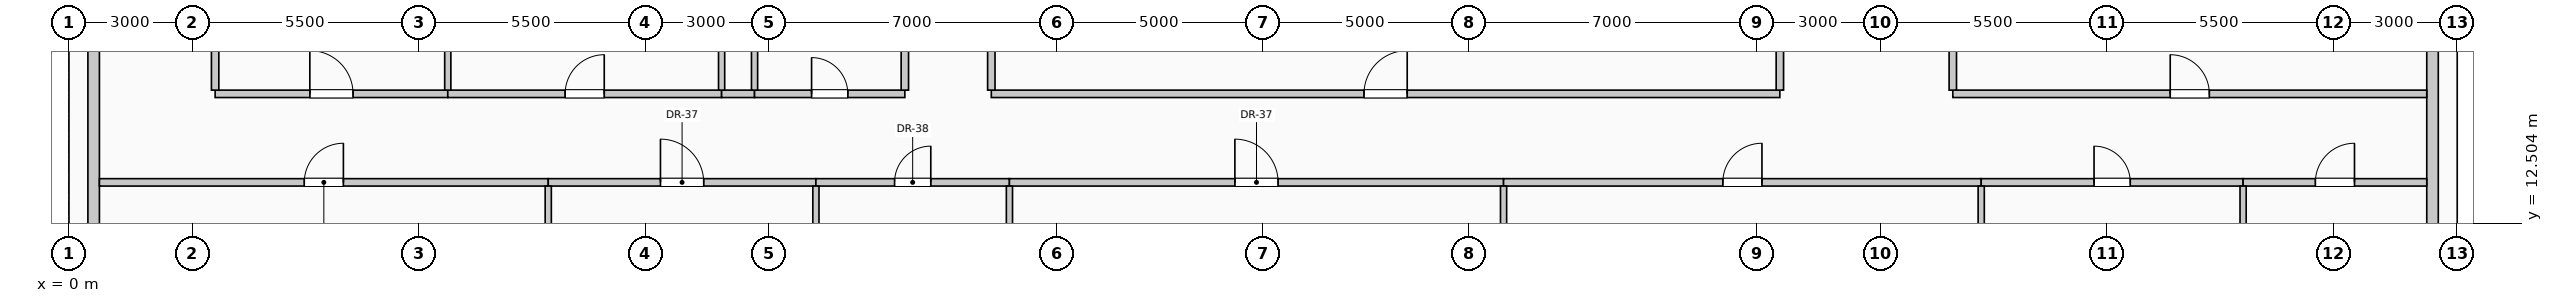
"""IFC4 building model, lengths in metres.
Left out: names, types, materials, properties, quantities, classifications, styles, units other than length and angle.
Written with IfcOpenShell. Run it as: python <this file> out.ifc"""

import sys

from ifc_helpers import new_model, si_unit, direction, frame, frame_2d, origin, place, context, subcontext, project, spatial, rectangle, extrude, element, fill, save


model = new_model("IFC4")
c1 = context("Model", 3, precision=1e-05, world=origin(), true_north=direction((0.0, 1.0)))
c2 = subcontext(c1, "Body", "Model", "MODEL_VIEW")
j1 = project(units=[si_unit("LENGTHUNIT", "METRE"), si_unit("PLANEANGLEUNIT", "RADIAN")], contexts=[c1])
p1 = place(None, origin())
s1 = spatial("IfcSite", under=j1, at=p1, CompositionType="ELEMENT")
p2 = place(p1, origin())
s2 = spatial("IfcBuilding", under=s1, at=p2, CompositionType="ELEMENT")
p3 = place(p2, frame((0.0, 0.0, 156.6)))
s3 = spatial("IfcBuildingStorey", under=s2, at=p3, CompositionType="ELEMENT", Elevation=156.6)
for number, where, z_axis, x_axis in (
    (1, (0.6, 10.445, 0.0), (0.0, 0.0, 1.0), (0.0, 1.0, 0.0)),
    (2, (57.4, 17.555, 0.0), (0.0, 0.0, 1.0), (0.0, -1.0, 0.0)),
):
    element("IfcWall", number, at=place(p3, frame(where, z_axis=z_axis, x_axis=x_axis)), inside=s3, PredefinedType="SOLIDWALL", context=c2, shape_type="SweptSolid", body=[
        extrude(rectangle(XDim=7.11, YDim=0.28, at=frame_2d((3.555, 0.0))), origin(), (0.0, 0.0, 1.0), 2.81),
    ])
p4 = place(p3, frame((0.74, 13.5, 0.0), z_axis=(0.0, 0.0, 1.0), x_axis=(1.0, 0.0, 0.0)))
e3 = element("IfcWall", 3, at=p4, inside=s3, PredefinedType="PARTITIONING", context=c2, shape_type="SweptSolid", body=[
    extrude(rectangle(XDim=10.9, YDim=0.18, at=frame_2d((5.45, 0.0))), origin(), (0.0, 0.0, 1.0), 3.66),
])
p5 = place(p4, frame((4.975, 0.0, 0.0)))
e4 = element("IfcOpeningElement", 4, at=p5, cuts=e3, PredefinedType="OPENING", context=c2, shape_type="SweptSolid", body=[
    extrude(rectangle(XDim=0.95, YDim=2.15, at=frame_2d((0.475, 1.075))), frame((0.0, 0.1, 0.0), z_axis=(0.0, -1.0, 0.0), x_axis=(1.0, 0.0, 0.0)), (0.0, 0.0, 1.0), 0.2),
])
p6 = place(p3, frame((11.64, 13.5, 0.0), z_axis=(0.0, 0.0, 1.0), x_axis=(1.0, 0.0, 0.0)))
e5 = element("IfcWall", 5, at=p6, inside=s3, PredefinedType="PARTITIONING", context=c2, shape_type="SweptSolid", body=[
    extrude(rectangle(XDim=6.5, YDim=0.18, at=frame_2d((3.25, 0.0))), origin(), (0.0, 0.0, 1.0), 3.66),
])
p7 = place(p6, frame((2.725, 0.0, 0.0)))
e6 = element("IfcOpeningElement", 6, at=p7, cuts=e5, PredefinedType="OPENING", context=c2, shape_type="SweptSolid", body=[
    extrude(rectangle(XDim=1.05, YDim=2.15, at=frame_2d((0.525, 1.075))), frame((0.0, 0.1, 0.0), z_axis=(0.0, -1.0, 0.0), x_axis=(1.0, 0.0, 0.0)), (0.0, 0.0, 1.0), 0.2),
])
p8 = place(p3, frame((18.14, 13.5, 0.0), z_axis=(0.0, 0.0, 1.0), x_axis=(1.0, 0.0, 0.0)))
e7 = element("IfcWall", 7, at=p8, inside=s3, PredefinedType="PARTITIONING", context=c2, shape_type="SweptSolid", body=[
    extrude(rectangle(XDim=4.7, YDim=0.18, at=frame_2d((2.35, 0.0))), origin(), (0.0, 0.0, 1.0), 3.66),
])
p9 = place(p8, frame((1.91, 0.0, 0.0)))
e8 = element("IfcOpeningElement", 8, at=p9, cuts=e7, PredefinedType="OPENING", context=c2, shape_type="SweptSolid", body=[
    extrude(rectangle(XDim=0.88, YDim=2.1, at=frame_2d((0.44, 1.05))), frame((0.0, 0.1, 0.0), z_axis=(0.0, -1.0, 0.0), x_axis=(1.0, 0.0, 0.0)), (0.0, 0.0, 1.0), 0.2),
])
p10 = place(p3, frame((22.84, 13.5, 0.0), z_axis=(0.0, 0.0, 1.0), x_axis=(1.0, 0.0, 0.0)))
e9 = element("IfcWall", 9, at=p10, inside=s3, PredefinedType="PARTITIONING", context=c2, shape_type="SweptSolid", body=[
    extrude(rectangle(XDim=12.0, YDim=0.18, at=frame_2d((6.0, 0.0))), origin(), (0.0, 0.0, 1.0), 3.66),
])
p11 = place(p10, frame((5.475, 0.0, 0.0)))
e10 = element("IfcOpeningElement", 10, at=p11, cuts=e9, PredefinedType="OPENING", context=c2, shape_type="SweptSolid", body=[
    extrude(rectangle(XDim=1.05, YDim=2.15, at=frame_2d((0.525, 1.075))), frame((0.0, 0.1, 0.0), z_axis=(0.0, -1.0, 0.0), x_axis=(1.0, 0.0, 0.0)), (0.0, 0.0, 1.0), 0.2),
])
p12 = place(p3, frame((34.84, 13.5, 0.0), z_axis=(0.0, 0.0, 1.0), x_axis=(1.0, 0.0, 0.0)))
e11 = element("IfcWall", 11, at=p12, inside=s3, PredefinedType="PARTITIONING", context=c2, shape_type="SweptSolid", body=[
    extrude(rectangle(XDim=11.6, YDim=0.18, at=frame_2d((5.8, 0.0))), origin(), (0.0, 0.0, 1.0), 3.66),
])
p13 = place(p12, frame((5.325, 0.0, 0.0)))
e12 = element("IfcOpeningElement", 12, at=p13, cuts=e11, PredefinedType="OPENING", context=c2, shape_type="SweptSolid", body=[
    extrude(rectangle(XDim=0.95, YDim=2.15, at=frame_2d((0.475, 1.075))), frame((0.0, 0.1, 0.0), z_axis=(0.0, -1.0, 0.0), x_axis=(1.0, 0.0, 0.0)), (0.0, 0.0, 1.0), 0.2),
])
p14 = place(p3, frame((46.44, 13.5, 0.0), z_axis=(0.0, 0.0, 1.0), x_axis=(1.0, 0.0, 0.0)))
e13 = element("IfcWall", 13, at=p14, inside=s3, PredefinedType="PARTITIONING", context=c2, shape_type="SweptSolid", body=[
    extrude(rectangle(XDim=6.36, YDim=0.18, at=frame_2d((3.18, 0.0))), origin(), (0.0, 0.0, 1.0), 3.66),
])
p15 = place(p14, frame((2.74, 0.0, 0.0)))
e14 = element("IfcOpeningElement", 14, at=p15, cuts=e13, PredefinedType="OPENING", context=c2, shape_type="SweptSolid", body=[
    extrude(rectangle(XDim=0.88, YDim=2.1, at=frame_2d((0.44, 1.05))), frame((0.0, 0.1, 0.0), z_axis=(0.0, -1.0, 0.0), x_axis=(1.0, 0.0, 0.0)), (0.0, 0.0, 1.0), 0.2),
])
p16 = place(p3, frame((52.8, 13.5, 0.0), z_axis=(0.0, 0.0, 1.0), x_axis=(1.0, 0.0, 0.0)))
e15 = element("IfcWall", 15, at=p16, inside=s3, PredefinedType="PARTITIONING", context=c2, shape_type="SweptSolid", body=[
    extrude(rectangle(XDim=4.46, YDim=0.18, at=frame_2d((2.23, 0.0))), origin(), (0.0, 0.0, 1.0), 3.66),
])
p17 = place(p16, frame((1.755, 0.0, 0.0)))
e16 = element("IfcOpeningElement", 16, at=p17, cuts=e15, PredefinedType="OPENING", context=c2, shape_type="SweptSolid", body=[
    extrude(rectangle(XDim=0.95, YDim=2.15, at=frame_2d((0.475, 1.075))), frame((0.0, 0.1, 0.0), z_axis=(0.0, -1.0, 0.0), x_axis=(1.0, 0.0, 0.0)), (0.0, 0.0, 1.0), 0.2),
])
p18 = place(p3, frame((3.55, 15.65, 0.0), z_axis=(0.0, 0.0, 1.0), x_axis=(1.0, 0.0, 0.0)))
e17 = element("IfcWall", 17, at=p18, inside=s3, PredefinedType="PARTITIONING", context=c2, shape_type="SweptSolid", body=[
    extrude(rectangle(XDim=5.65, YDim=0.18, at=frame_2d((2.825, 0.0))), origin(), (0.0, 0.0, 1.0), 3.66),
])
p19 = place(p18, frame((2.3, 0.0, 0.0)))
e18 = element("IfcOpeningElement", 18, at=p19, cuts=e17, PredefinedType="OPENING", context=c2, shape_type="SweptSolid", body=[
    extrude(rectangle(XDim=1.05, YDim=2.15, at=frame_2d((0.525, 1.075))), frame((0.0, 0.1, 0.0), z_axis=(0.0, -1.0, 0.0), x_axis=(1.0, 0.0, 0.0)), (0.0, 0.0, 1.0), 0.2),
])
p20 = place(p3, frame((9.2, 15.65, 0.0), z_axis=(0.0, 0.0, 1.0), x_axis=(1.0, 0.0, 0.0)))
e19 = element("IfcWall", 19, at=p20, inside=s3, PredefinedType="PARTITIONING", context=c2, shape_type="SweptSolid", body=[
    extrude(rectangle(XDim=6.65, YDim=0.18, at=frame_2d((3.325, 0.0))), origin(), (0.0, 0.0, 1.0), 3.66),
])
p21 = place(p20, frame((2.85, 0.0, 0.0)))
e20 = element("IfcOpeningElement", 20, at=p21, cuts=e19, PredefinedType="OPENING", context=c2, shape_type="SweptSolid", body=[
    extrude(rectangle(XDim=0.95, YDim=2.15, at=frame_2d((0.475, 1.075))), frame((0.0, 0.1, 0.0), z_axis=(0.0, -1.0, 0.0), x_axis=(1.0, 0.0, 0.0)), (0.0, 0.0, 1.0), 0.2),
])
p22 = place(p3, frame((15.85, 15.65, 0.0), z_axis=(0.0, 0.0, 1.0), x_axis=(1.0, 0.0, 0.0)))
e21 = element("IfcWall", 21, at=p22, inside=s3, PredefinedType="PARTITIONING", context=c2, shape_type="SweptSolid", body=[
    extrude(rectangle(XDim=0.8, YDim=0.18, at=frame_2d((0.4, 0.0))), origin(), (0.0, 0.0, 1.0), 3.66),
])
p23 = place(p3, frame((16.65, 15.65, 0.0), z_axis=(0.0, 0.0, 1.0), x_axis=(1.0, 0.0, 0.0)))
e22 = element("IfcWall", 22, at=p23, inside=s3, PredefinedType="PARTITIONING", context=c2, shape_type="SweptSolid", body=[
    extrude(rectangle(XDim=3.65, YDim=0.18, at=frame_2d((1.825, 0.0))), origin(), (0.0, 0.0, 1.0), 3.66),
])
p24 = place(p23, frame((1.385, 0.0, 0.0)))
e23 = element("IfcOpeningElement", 23, at=p24, cuts=e22, PredefinedType="OPENING", context=c2, shape_type="SweptSolid", body=[
    extrude(rectangle(XDim=0.88, YDim=2.1, at=frame_2d((0.44, 1.05))), frame((0.0, 0.1, 0.0), z_axis=(0.0, -1.0, 0.0), x_axis=(1.0, 0.0, 0.0)), (0.0, 0.0, 1.0), 0.2),
])
p25 = place(p3, frame((22.4, 15.65, 0.0), z_axis=(0.0, 0.0, 1.0), x_axis=(1.0, 0.0, 0.0)))
e24 = element("IfcWall", 24, at=p25, inside=s3, PredefinedType="PARTITIONING", context=c2, shape_type="SweptSolid", body=[
    extrude(rectangle(XDim=19.15, YDim=0.18, at=frame_2d((9.575, 0.0))), origin(), (0.0, 0.0, 1.0), 3.66),
])
p26 = place(p25, frame((9.05, 0.0, 0.0)))
e25 = element("IfcOpeningElement", 25, at=p26, cuts=e24, PredefinedType="OPENING", context=c2, shape_type="SweptSolid", body=[
    extrude(rectangle(XDim=1.05, YDim=2.15, at=frame_2d((0.525, 1.075))), frame((0.0, 0.1, 0.0), z_axis=(0.0, -1.0, 0.0), x_axis=(1.0, 0.0, 0.0)), (0.0, 0.0, 1.0), 0.2),
])
p27 = place(p3, frame((45.75, 15.65, 0.0), z_axis=(0.0, 0.0, 1.0), x_axis=(1.0, 0.0, 0.0)))
e26 = element("IfcWall", 26, at=p27, inside=s3, PredefinedType="PARTITIONING", context=c2, shape_type="SweptSolid", body=[
    extrude(rectangle(XDim=11.51, YDim=0.18, at=frame_2d((5.755, 0.0))), origin(), (0.0, 0.0, 1.0), 3.66),
])
p28 = place(p27, frame((5.28, 0.0, 0.0)))
e27 = element("IfcOpeningElement", 27, at=p28, cuts=e26, PredefinedType="OPENING", context=c2, shape_type="SweptSolid", body=[
    extrude(rectangle(XDim=0.95, YDim=2.15, at=frame_2d((0.475, 1.075))), frame((0.0, 0.1, 0.0), z_axis=(0.0, -1.0, 0.0), x_axis=(1.0, 0.0, 0.0)), (0.0, 0.0, 1.0), 0.2),
])
p29 = place(p3, frame((3.55, 15.74, 0.0), z_axis=(0.0, 0.0, 1.0), x_axis=(0.0, 1.0, 0.0)))
e28 = element("IfcWall", 28, at=p29, inside=s3, PredefinedType="PARTITIONING", context=c2, shape_type="SweptSolid", body=[
    extrude(rectangle(XDim=3.135, YDim=0.18, at=frame_2d((1.567, 0.0))), origin(), (0.0, 0.0, 1.0), 3.66),
])
p30 = place(p3, frame((9.2, 15.74, 0.0), z_axis=(0.0, 0.0, 1.0), x_axis=(0.0, 1.0, 0.0)))
e29 = element("IfcWall", 29, at=p30, inside=s3, PredefinedType="PARTITIONING", context=c2, shape_type="SweptSolid", body=[
    extrude(rectangle(XDim=3.135, YDim=0.15, at=frame_2d((1.567, 0.0))), origin(), (0.0, 0.0, 1.0), 3.66),
])
p31 = place(p3, frame((11.64, 0.74, 0.0), z_axis=(0.0, 0.0, 1.0), x_axis=(0.0, 1.0, 0.0)))
e30 = element("IfcWall", 30, at=p31, inside=s3, PredefinedType="PARTITIONING", context=c2, shape_type="SweptSolid", body=[
    extrude(rectangle(XDim=12.67, YDim=0.15, at=frame_2d((6.335, 0.0))), origin(), (0.0, 0.0, 1.0), 3.66),
])
p32 = place(p3, frame((15.85, 15.74, 0.0), z_axis=(0.0, 0.0, 1.0), x_axis=(0.0, 1.0, 0.0)))
e31 = element("IfcWall", 31, at=p32, inside=s3, PredefinedType="PARTITIONING", context=c2, shape_type="SweptSolid", body=[
    extrude(rectangle(XDim=1.76, YDim=0.15, at=frame_2d((0.88, 0.0))), origin(), (0.0, 0.0, 1.0), 3.66),
])
p33 = place(p3, frame((16.65, 15.74, 0.0), z_axis=(0.0, 0.0, 1.0), x_axis=(0.0, 1.0, 0.0)))
e32 = element("IfcWall", 32, at=p33, inside=s3, PredefinedType="PARTITIONING", context=c2, shape_type="SweptSolid", body=[
    extrude(rectangle(XDim=1.76, YDim=0.15, at=frame_2d((0.88, 0.0))), origin(), (0.0, 0.0, 1.0), 3.005),
])
p34 = place(p3, frame((18.14, 0.74, 0.0), z_axis=(0.0, 0.0, 1.0), x_axis=(0.0, 1.0, 0.0)))
e33 = element("IfcWall", 33, at=p34, inside=s3, PredefinedType="PARTITIONING", context=c2, shape_type="SweptSolid", body=[
    extrude(rectangle(XDim=12.67, YDim=0.15, at=frame_2d((6.335, 0.0))), origin(), (0.0, 0.0, 1.0), 3.66),
])
p35 = place(p3, frame((20.3, 15.74, 0.0), z_axis=(0.0, 0.0, 1.0), x_axis=(0.0, 1.0, 0.0)))
e34 = element("IfcWall", 34, at=p35, inside=s3, PredefinedType="PARTITIONING", context=c2, shape_type="SweptSolid", body=[
    extrude(rectangle(XDim=12.385, YDim=0.18, at=frame_2d((6.192, 0.0))), origin(), (0.0, 0.0, 1.0), 3.66),
])
p36 = place(p3, frame((22.4, 15.74, 0.0), z_axis=(0.0, 0.0, 1.0), x_axis=(0.0, 1.0, 0.0)))
e35 = element("IfcWall", 35, at=p36, inside=s3, PredefinedType="PARTITIONING", context=c2, shape_type="SweptSolid", body=[
    extrude(rectangle(XDim=14.37, YDim=0.18, at=frame_2d((7.185, 0.0))), origin(), (0.0, 0.0, 1.0), 3.66),
])
for number, where, z_axis, x_axis in (
    (36, (22.84, 0.74, 0.0), (0.0, 0.0, 1.0), (0.0, 1.0, 0.0)),
    (37, (34.84, 0.74, 0.0), (0.0, 0.0, 1.0), (0.0, 1.0, 0.0)),
):
    element("IfcWall", number, at=place(p3, frame(where, z_axis=z_axis, x_axis=x_axis)), inside=s3, PredefinedType="PARTITIONING", context=c2, shape_type="SweptSolid", body=[
        extrude(rectangle(XDim=12.67, YDim=0.15, at=frame_2d((6.335, 0.0))), origin(), (0.0, 0.0, 1.0), 3.66),
    ])
p37 = place(p3, frame((41.55, 15.74, 0.0), z_axis=(0.0, 0.0, 1.0), x_axis=(0.0, 1.0, 0.0)))
e38 = element("IfcWall", 38, at=p37, inside=s3, PredefinedType="PARTITIONING", context=c2, shape_type="SweptSolid", body=[
    extrude(rectangle(XDim=1.76, YDim=0.18, at=frame_2d((0.88, 0.0))), origin(), (0.0, 0.0, 1.0), 3.005),
])
p38 = place(p3, frame((45.75, 15.74, 0.0), z_axis=(0.0, 0.0, 1.0), x_axis=(0.0, 1.0, 0.0)))
e39 = element("IfcWall", 39, at=p38, inside=s3, PredefinedType="PARTITIONING", context=c2, shape_type="SweptSolid", body=[
    extrude(rectangle(XDim=16.535, YDim=0.18, at=frame_2d((8.268, 0.0))), origin(), (0.0, 0.0, 1.0), 3.66),
])
for number, where, z_axis, x_axis in (
    (40, (46.44, 0.74, 0.0), (0.0, 0.0, 1.0), (0.0, 1.0, 0.0)),
    (41, (52.8, 0.74, 0.0), (0.0, 0.0, 1.0), (0.0, 1.0, 0.0)),
):
    element("IfcWall", number, at=place(p3, frame(where, z_axis=z_axis, x_axis=x_axis)), inside=s3, PredefinedType="PARTITIONING", context=c2, shape_type="SweptSolid", body=[
        extrude(rectangle(XDim=12.67, YDim=0.15, at=frame_2d((6.335, 0.0))), origin(), (0.0, 0.0, 1.0), 3.66),
    ])
p39 = place(p5, origin())
e42 = element("IfcDoor", 42, at=p39, inside=s3, OperationType="SINGLE_SWING_RIGHT", PredefinedType="DOOR", context=c2, shape_type="SweptSolid", body=[
    extrude(rectangle(XDim=0.95, YDim=2.15, at=frame_2d((0.475, 1.075))), frame((0.0, 0.025, 0.0), z_axis=(0.0, -1.0, 0.0), x_axis=(1.0, 0.0, 0.0)), (0.0, 0.0, 1.0), 0.05),
])
fill(e4, e42)
p40 = place(p7, origin())
e43 = element("IfcDoor", 43, at=p40, inside=s3, OperationType="SINGLE_SWING_LEFT", PredefinedType="DOOR", context=c2, shape_type="SweptSolid", body=[
    extrude(rectangle(XDim=1.05, YDim=2.15, at=frame_2d((0.525, 1.075))), frame((0.0, 0.025, 0.0), z_axis=(0.0, -1.0, 0.0), x_axis=(1.0, 0.0, 0.0)), (0.0, 0.0, 1.0), 0.05),
])
fill(e6, e43)
p41 = place(p9, origin())
e44 = element("IfcDoor", 44, at=p41, inside=s3, OperationType="SINGLE_SWING_RIGHT", PredefinedType="DOOR", context=c2, shape_type="SweptSolid", body=[
    extrude(rectangle(XDim=0.88, YDim=2.1, at=frame_2d((0.44, 1.05))), frame((0.0, 0.025, 0.0), z_axis=(0.0, -1.0, 0.0), x_axis=(1.0, 0.0, 0.0)), (0.0, 0.0, 1.0), 0.05),
])
fill(e8, e44)
p42 = place(p11, origin())
e45 = element("IfcDoor", 45, at=p42, inside=s3, OperationType="SINGLE_SWING_LEFT", PredefinedType="DOOR", context=c2, shape_type="SweptSolid", body=[
    extrude(rectangle(XDim=1.05, YDim=2.15, at=frame_2d((0.525, 1.075))), frame((0.0, 0.025, 0.0), z_axis=(0.0, -1.0, 0.0), x_axis=(1.0, 0.0, 0.0)), (0.0, 0.0, 1.0), 0.05),
])
fill(e10, e45)
p43 = place(p13, origin())
e46 = element("IfcDoor", 46, at=p43, inside=s3, OperationType="SINGLE_SWING_RIGHT", PredefinedType="DOOR", context=c2, shape_type="SweptSolid", body=[
    extrude(rectangle(XDim=0.95, YDim=2.15, at=frame_2d((0.475, 1.075))), frame((0.0, 0.025, 0.0), z_axis=(0.0, -1.0, 0.0), x_axis=(1.0, 0.0, 0.0)), (0.0, 0.0, 1.0), 0.05),
])
fill(e12, e46)
p44 = place(p15, origin())
e47 = element("IfcDoor", 47, at=p44, inside=s3, OperationType="SINGLE_SWING_LEFT", PredefinedType="DOOR", context=c2, shape_type="SweptSolid", body=[
    extrude(rectangle(XDim=0.88, YDim=2.1, at=frame_2d((0.44, 1.05))), frame((0.0, 0.025, 0.0), z_axis=(0.0, -1.0, 0.0), x_axis=(1.0, 0.0, 0.0)), (0.0, 0.0, 1.0), 0.05),
])
fill(e14, e47)
p45 = place(p17, origin())
e48 = element("IfcDoor", 48, at=p45, inside=s3, OperationType="SINGLE_SWING_RIGHT", PredefinedType="DOOR", context=c2, shape_type="SweptSolid", body=[
    extrude(rectangle(XDim=0.95, YDim=2.15, at=frame_2d((0.475, 1.075))), frame((0.0, 0.025, 0.0), z_axis=(0.0, -1.0, 0.0), x_axis=(1.0, 0.0, 0.0)), (0.0, 0.0, 1.0), 0.05),
])
fill(e16, e48)
p46 = place(p19, origin())
e49 = element("IfcDoor", 49, at=p46, inside=s3, OperationType="SINGLE_SWING_LEFT", PredefinedType="DOOR", context=c2, shape_type="SweptSolid", body=[
    extrude(rectangle(XDim=1.05, YDim=2.15, at=frame_2d((0.525, 1.075))), frame((0.0, 0.025, 0.0), z_axis=(0.0, -1.0, 0.0), x_axis=(1.0, 0.0, 0.0)), (0.0, 0.0, 1.0), 0.05),
])
fill(e18, e49)
p47 = place(p21, origin())
e50 = element("IfcDoor", 50, at=p47, inside=s3, OperationType="SINGLE_SWING_RIGHT", PredefinedType="DOOR", context=c2, shape_type="SweptSolid", body=[
    extrude(rectangle(XDim=0.95, YDim=2.15, at=frame_2d((0.475, 1.075))), frame((0.0, 0.025, 0.0), z_axis=(0.0, -1.0, 0.0), x_axis=(1.0, 0.0, 0.0)), (0.0, 0.0, 1.0), 0.05),
])
fill(e20, e50)
p48 = place(p24, origin())
e51 = element("IfcDoor", 51, at=p48, inside=s3, OperationType="SINGLE_SWING_LEFT", PredefinedType="DOOR", context=c2, shape_type="SweptSolid", body=[
    extrude(rectangle(XDim=0.88, YDim=2.1, at=frame_2d((0.44, 1.05))), frame((0.0, 0.025, 0.0), z_axis=(0.0, -1.0, 0.0), x_axis=(1.0, 0.0, 0.0)), (0.0, 0.0, 1.0), 0.05),
])
fill(e23, e51)
p49 = place(p26, origin())
e52 = element("IfcDoor", 52, at=p49, inside=s3, OperationType="SINGLE_SWING_RIGHT", PredefinedType="DOOR", context=c2, shape_type="SweptSolid", body=[
    extrude(rectangle(XDim=1.05, YDim=2.15, at=frame_2d((0.525, 1.075))), frame((0.0, 0.025, 0.0), z_axis=(0.0, -1.0, 0.0), x_axis=(1.0, 0.0, 0.0)), (0.0, 0.0, 1.0), 0.05),
])
fill(e25, e52)
p50 = place(p28, origin())
e53 = element("IfcDoor", 53, at=p50, inside=s3, OperationType="SINGLE_SWING_LEFT", PredefinedType="DOOR", context=c2, shape_type="SweptSolid", body=[
    extrude(rectangle(XDim=0.95, YDim=2.15, at=frame_2d((0.475, 1.075))), frame((0.0, 0.025, 0.0), z_axis=(0.0, -1.0, 0.0), x_axis=(1.0, 0.0, 0.0)), (0.0, 0.0, 1.0), 0.05),
])
fill(e27, e53)
save(model, sys.argv[1])
